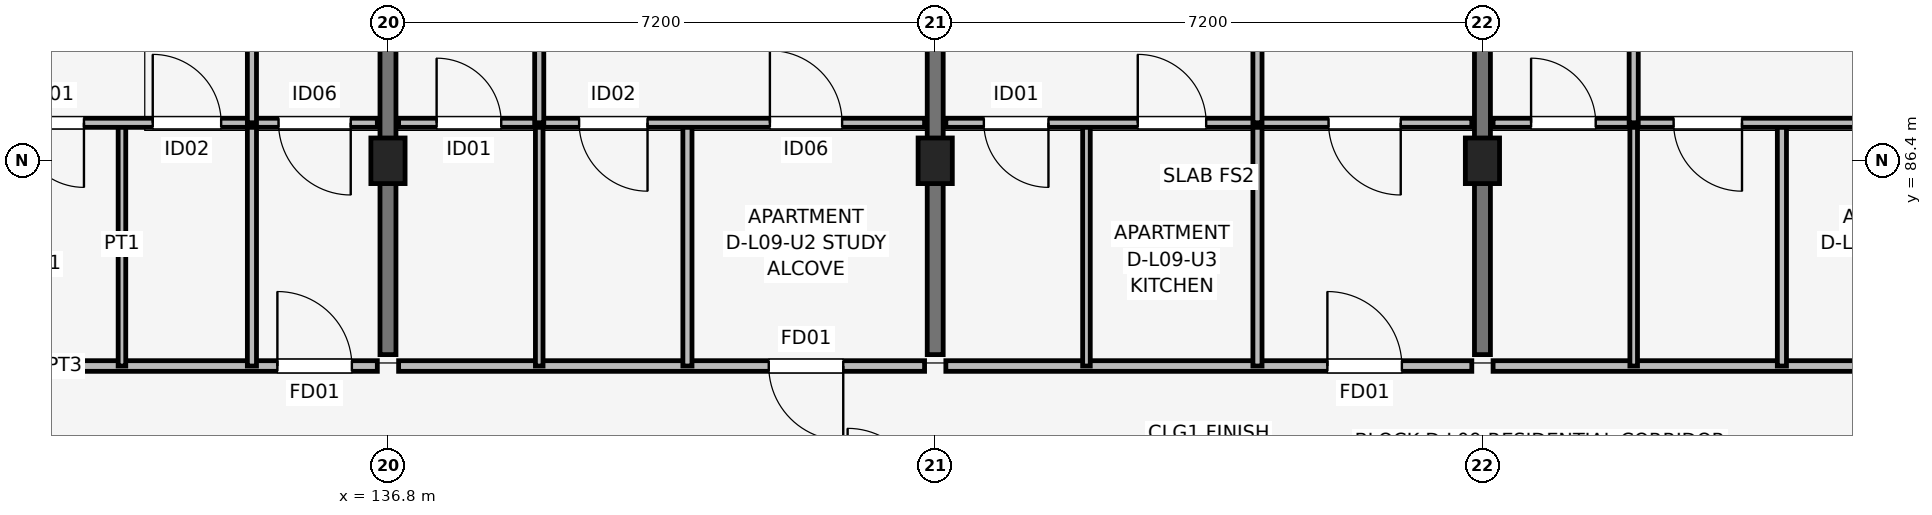
"""IFC4 building model, lengths in metres.
Left out: names, types, materials, properties, quantities, classifications, styles, units other than length and angle.
Written with IfcOpenShell. Run it as: python <this file> out.ifc"""

import sys

from ifc_helpers import new_model, si_unit, direction, frame, frame_2d, origin, origin_2d, place, context, subcontext, project, spatial, rectangle, extrude, element, fill, save


model = new_model("IFC4")
c1 = context("Model", 3, precision=1e-05, world=origin(), true_north=direction((0.0, 1.0)))
c2 = subcontext(c1, "Body", "Model", "MODEL_VIEW")
j1 = project(units=[si_unit("LENGTHUNIT", "METRE"), si_unit("PLANEANGLEUNIT", "RADIAN")], contexts=[c1])
p1 = place(None, origin())
s1 = spatial("IfcSite", under=j1, at=p1, CompositionType="ELEMENT")
p2 = place(p1, origin())
s2 = spatial("IfcBuilding", under=s1, at=p2, CompositionType="ELEMENT")
p3 = place(p2, frame((0.0, 0.0, 30.75)))
s3 = spatial("IfcBuildingStorey", under=s2, at=p3, CompositionType="ELEMENT", Elevation=30.75)
for number, where, z_axis, x_axis in (
    (1, (136.8, 86.4, 0.0), (0.0, 0.0, 1.0), (1.0, 0.0, 0.0)),
    (2, (144.0, 86.4, 0.0), (0.0, 0.0, 1.0), (1.0, 0.0, 0.0)),
    (3, (151.2, 86.4, 0.0), (0.0, 0.0, 1.0), (1.0, 0.0, 0.0)),
):
    element("IfcColumn", number, at=place(p3, frame(where, z_axis=z_axis, x_axis=x_axis)), inside=s3, PredefinedType="COLUMN", context=c2, shape_type="SweptSolid", body=[
        extrude(rectangle(XDim=0.45, YDim=0.6, at=origin_2d()), origin(), (0.0, 0.0, 1.0), 3.15),
    ])
for number, where, z_axis, x_axis in (
    (4, (136.8, 83.85, 0.0), (0.0, 0.0, 1.0), (0.0, 1.0, 0.0)),
    (5, (144.0, 83.85, 0.0), (0.0, 0.0, 1.0), (0.0, 1.0, 0.0)),
    (6, (151.2, 83.85, 0.0), (0.0, 0.0, 1.0), (0.0, 1.0, 0.0)),
):
    element("IfcWall", number, at=place(p3, frame(where, z_axis=z_axis, x_axis=x_axis)), inside=s3, PredefinedType="SHEAR", context=c2, shape_type="SweptSolid", body=[
        extrude(rectangle(XDim=9.4, YDim=0.21, at=frame_2d((4.7, 0.0))), origin(), (0.0, 0.0, 1.0), 3.15),
    ])
p4 = place(p3, frame((129.74, 83.7, 0.0), z_axis=(0.0, 0.0, 1.0), x_axis=(1.0, 0.0, 0.0)))
e7 = element("IfcWall", 7, at=p4, inside=s3, PredefinedType="PARTITIONING", context=c2, shape_type="SweptSolid", body=[
    extrude(rectangle(XDim=6.92, YDim=0.14, at=frame_2d((3.46, 0.0))), origin(), (0.0, 0.0, 1.0), 2.38),
])
p5 = place(p4, frame((5.605, 0.0, 0.0)))
e8 = element("IfcOpeningElement", 8, at=p5, cuts=e7, PredefinedType="OPENING", context=c2, shape_type="SweptSolid", body=[
    extrude(rectangle(XDim=0.98, YDim=2.1, at=frame_2d((0.49, 1.05))), frame((0.0, 0.08, 0.0), z_axis=(0.0, -1.0, 0.0), x_axis=(1.0, 0.0, 0.0)), (0.0, 0.0, 1.0), 0.16),
])
p6 = place(p3, frame((133.3, 83.7, 0.0), z_axis=(0.0, 0.0, 1.0), x_axis=(0.0, 1.0, 0.0)))
e9 = element("IfcWall", 9, at=p6, inside=s3, PredefinedType="PARTITIONING", context=c2, shape_type="SweptSolid", body=[
    extrude(rectangle(XDim=3.2, YDim=0.1, at=frame_2d((1.6, 0.0))), origin(), (0.0, 0.0, 1.0), 2.38),
])
p7 = place(p3, frame((135.01, 83.7, 0.0), z_axis=(0.0, 0.0, 1.0), x_axis=(0.0, 1.0, 0.0)))
e10 = element("IfcWall", 10, at=p7, inside=s3, PredefinedType="PARTITIONING", context=c2, shape_type="SweptSolid", body=[
    extrude(rectangle(XDim=3.2, YDim=0.12, at=frame_2d((1.6, 0.0))), origin(), (0.0, 0.0, 1.0), 2.38),
])
p8 = place(p3, frame((129.74, 86.9, 0.0), z_axis=(0.0, 0.0, 1.0), x_axis=(1.0, 0.0, 0.0)))
e11 = element("IfcWall", 11, at=p8, inside=s3, PredefinedType="PARTITIONING", context=c2, shape_type="SweptSolid", body=[
    extrude(rectangle(XDim=6.92, YDim=0.12, at=frame_2d((3.46, 0.0))), origin(), (0.0, 0.0, 1.0), 2.38),
])
p9 = place(p8, frame((3.06, 0.0, 0.0), z_axis=(0.0, 0.0, 1.0), x_axis=(-1.0, 0.0, 0.0)))
e12 = element("IfcOpeningElement", 12, at=p9, cuts=e11, PredefinedType="OPENING", context=c2, shape_type="SweptSolid", body=[
    extrude(rectangle(XDim=0.85, YDim=2.08, at=frame_2d((0.425, 1.04))), frame((0.0, 0.07, 0.0), z_axis=(0.0, -1.0, 0.0), x_axis=(1.0, 0.0, 0.0)), (0.0, 0.0, 1.0), 0.14),
])
p10 = place(p8, frame((3.965, 0.0, 0.0)))
e13 = element("IfcOpeningElement", 13, at=p10, cuts=e11, PredefinedType="OPENING", context=c2, shape_type="SweptSolid", body=[
    extrude(rectangle(XDim=0.9, YDim=2.08, at=frame_2d((0.45, 1.04))), frame((0.0, 0.07, 0.0), z_axis=(0.0, -1.0, 0.0), x_axis=(1.0, 0.0, 0.0)), (0.0, 0.0, 1.0), 0.14),
])
p11 = place(p8, frame((6.57, 0.0, 0.0), z_axis=(0.0, 0.0, 1.0), x_axis=(-1.0, 0.0, 0.0)))
e14 = element("IfcOpeningElement", 14, at=p11, cuts=e11, PredefinedType="OPENING", context=c2, shape_type="SweptSolid", body=[
    extrude(rectangle(XDim=0.95, YDim=2.08, at=frame_2d((0.475, 1.04))), frame((0.0, 0.07, 0.0), z_axis=(0.0, -1.0, 0.0), x_axis=(1.0, 0.0, 0.0)), (0.0, 0.0, 1.0), 0.14),
])
p12 = place(p3, frame((135.01, 86.9, 0.0), z_axis=(0.0, 0.0, 1.0), x_axis=(0.0, 1.0, 0.0)))
e15 = element("IfcWall", 15, at=p12, inside=s3, PredefinedType="PARTITIONING", context=c2, shape_type="SweptSolid", body=[
    extrude(rectangle(XDim=6.4, YDim=0.12, at=frame_2d((3.2, 0.0))), origin(), (0.0, 0.0, 1.0), 2.38),
])
p13 = place(p12, frame((2.75, 0.0, 0.0)))
e16 = element("IfcOpeningElement", 16, at=p13, cuts=e15, PredefinedType="OPENING", context=c2, shape_type="SweptSolid", body=[
    extrude(rectangle(XDim=0.9, YDim=2.08, at=frame_2d((0.45, 1.04))), frame((0.0, 0.07, 0.0), z_axis=(0.0, -1.0, 0.0), x_axis=(1.0, 0.0, 0.0)), (0.0, 0.0, 1.0), 0.14),
])
p14 = place(p3, frame((136.94, 83.7, 0.0), z_axis=(0.0, 0.0, 1.0), x_axis=(1.0, 0.0, 0.0)))
e17 = element("IfcWall", 17, at=p14, inside=s3, PredefinedType="PARTITIONING", context=c2, shape_type="SweptSolid", body=[
    extrude(rectangle(XDim=6.92, YDim=0.14, at=frame_2d((3.46, 0.0))), origin(), (0.0, 0.0, 1.0), 2.38),
])
p15 = place(p14, frame((5.85, 0.0, 0.0), z_axis=(0.0, 0.0, 1.0), x_axis=(-1.0, 0.0, 0.0)))
e18 = element("IfcOpeningElement", 18, at=p15, cuts=e17, PredefinedType="OPENING", context=c2, shape_type="SweptSolid", body=[
    extrude(rectangle(XDim=0.98, YDim=2.1, at=frame_2d((0.49, 1.05))), frame((0.0, 0.08, 0.0), z_axis=(0.0, -1.0, 0.0), x_axis=(1.0, 0.0, 0.0)), (0.0, 0.0, 1.0), 0.16),
])
p16 = place(p3, frame((138.79, 83.7, 0.0), z_axis=(0.0, 0.0, 1.0), x_axis=(0.0, 1.0, 0.0)))
e19 = element("IfcWall", 19, at=p16, inside=s3, PredefinedType="PARTITIONING", context=c2, shape_type="SweptSolid", body=[
    extrude(rectangle(XDim=3.2, YDim=0.1, at=frame_2d((1.6, 0.0))), origin(), (0.0, 0.0, 1.0), 2.38),
])
p17 = place(p3, frame((140.74, 83.7, 0.0), z_axis=(0.0, 0.0, 1.0), x_axis=(0.0, 1.0, 0.0)))
e20 = element("IfcWall", 20, at=p17, inside=s3, PredefinedType="PARTITIONING", context=c2, shape_type="SweptSolid", body=[
    extrude(rectangle(XDim=3.2, YDim=0.12, at=frame_2d((1.6, 0.0))), origin(), (0.0, 0.0, 1.0), 2.38),
])
p18 = place(p3, frame((136.94, 86.9, 0.0), z_axis=(0.0, 0.0, 1.0), x_axis=(1.0, 0.0, 0.0)))
e21 = element("IfcWall", 21, at=p18, inside=s3, PredefinedType="PARTITIONING", context=c2, shape_type="SweptSolid", body=[
    extrude(rectangle(XDim=6.92, YDim=0.12, at=frame_2d((3.46, 0.0))), origin(), (0.0, 0.0, 1.0), 2.38),
])
p19 = place(p18, frame((0.5, 0.0, 0.0)))
e22 = element("IfcOpeningElement", 22, at=p19, cuts=e21, PredefinedType="OPENING", context=c2, shape_type="SweptSolid", body=[
    extrude(rectangle(XDim=0.85, YDim=2.08, at=frame_2d((0.425, 1.04))), frame((0.0, 0.07, 0.0), z_axis=(0.0, -1.0, 0.0), x_axis=(1.0, 0.0, 0.0)), (0.0, 0.0, 1.0), 0.14),
])
p20 = place(p18, frame((3.275, 0.0, 0.0), z_axis=(0.0, 0.0, 1.0), x_axis=(-1.0, 0.0, 0.0)))
e23 = element("IfcOpeningElement", 23, at=p20, cuts=e21, PredefinedType="OPENING", context=c2, shape_type="SweptSolid", body=[
    extrude(rectangle(XDim=0.9, YDim=2.08, at=frame_2d((0.45, 1.04))), frame((0.0, 0.07, 0.0), z_axis=(0.0, -1.0, 0.0), x_axis=(1.0, 0.0, 0.0)), (0.0, 0.0, 1.0), 0.14),
])
p21 = place(p18, frame((4.885, 0.0, 0.0)))
e24 = element("IfcOpeningElement", 24, at=p21, cuts=e21, PredefinedType="OPENING", context=c2, shape_type="SweptSolid", body=[
    extrude(rectangle(XDim=0.95, YDim=2.08, at=frame_2d((0.475, 1.04))), frame((0.0, 0.07, 0.0), z_axis=(0.0, -1.0, 0.0), x_axis=(1.0, 0.0, 0.0)), (0.0, 0.0, 1.0), 0.14),
])
p22 = place(p3, frame((138.79, 86.9, 0.0), z_axis=(0.0, 0.0, 1.0), x_axis=(0.0, 1.0, 0.0)))
e25 = element("IfcWall", 25, at=p22, inside=s3, PredefinedType="PARTITIONING", context=c2, shape_type="SweptSolid", body=[
    extrude(rectangle(XDim=6.4, YDim=0.12, at=frame_2d((3.2, 0.0))), origin(), (0.0, 0.0, 1.0), 2.38),
])
p23 = place(p22, frame((3.65, 0.0, 0.0), z_axis=(0.0, 0.0, 1.0), x_axis=(-1.0, 0.0, 0.0)))
e26 = element("IfcOpeningElement", 26, at=p23, cuts=e25, PredefinedType="OPENING", context=c2, shape_type="SweptSolid", body=[
    extrude(rectangle(XDim=0.9, YDim=2.08, at=frame_2d((0.45, 1.04))), frame((0.0, 0.07, 0.0), z_axis=(0.0, -1.0, 0.0), x_axis=(1.0, 0.0, 0.0)), (0.0, 0.0, 1.0), 0.14),
])
p24 = place(p3, frame((144.14, 83.7, 0.0), z_axis=(0.0, 0.0, 1.0), x_axis=(1.0, 0.0, 0.0)))
e27 = element("IfcWall", 27, at=p24, inside=s3, PredefinedType="PARTITIONING", context=c2, shape_type="SweptSolid", body=[
    extrude(rectangle(XDim=6.92, YDim=0.14, at=frame_2d((3.46, 0.0))), origin(), (0.0, 0.0, 1.0), 2.38),
])
p25 = place(p24, frame((5.02, 0.0, 0.0)))
e28 = element("IfcOpeningElement", 28, at=p25, cuts=e27, PredefinedType="OPENING", context=c2, shape_type="SweptSolid", body=[
    extrude(rectangle(XDim=0.98, YDim=2.1, at=frame_2d((0.49, 1.05))), frame((0.0, 0.08, 0.0), z_axis=(0.0, -1.0, 0.0), x_axis=(1.0, 0.0, 0.0)), (0.0, 0.0, 1.0), 0.16),
])
p26 = place(p3, frame((145.99, 83.7, 0.0), z_axis=(0.0, 0.0, 1.0), x_axis=(0.0, 1.0, 0.0)))
e29 = element("IfcWall", 29, at=p26, inside=s3, PredefinedType="PARTITIONING", context=c2, shape_type="SweptSolid", body=[
    extrude(rectangle(XDim=3.2, YDim=0.1, at=frame_2d((1.6, 0.0))), origin(), (0.0, 0.0, 1.0), 2.38),
])
p27 = place(p3, frame((148.24, 83.7, 0.0), z_axis=(0.0, 0.0, 1.0), x_axis=(0.0, 1.0, 0.0)))
e30 = element("IfcWall", 30, at=p27, inside=s3, PredefinedType="PARTITIONING", context=c2, shape_type="SweptSolid", body=[
    extrude(rectangle(XDim=3.2, YDim=0.12, at=frame_2d((1.6, 0.0))), origin(), (0.0, 0.0, 1.0), 2.38),
])
p28 = place(p3, frame((144.14, 86.9, 0.0), z_axis=(0.0, 0.0, 1.0), x_axis=(1.0, 0.0, 0.0)))
e31 = element("IfcWall", 31, at=p28, inside=s3, PredefinedType="PARTITIONING", context=c2, shape_type="SweptSolid", body=[
    extrude(rectangle(XDim=6.92, YDim=0.12, at=frame_2d((3.46, 0.0))), origin(), (0.0, 0.0, 1.0), 2.38),
])
p29 = place(p28, frame((1.35, 0.0, 0.0), z_axis=(0.0, 0.0, 1.0), x_axis=(-1.0, 0.0, 0.0)))
e32 = element("IfcOpeningElement", 32, at=p29, cuts=e31, PredefinedType="OPENING", context=c2, shape_type="SweptSolid", body=[
    extrude(rectangle(XDim=0.85, YDim=2.08, at=frame_2d((0.425, 1.04))), frame((0.0, 0.07, 0.0), z_axis=(0.0, -1.0, 0.0), x_axis=(1.0, 0.0, 0.0)), (0.0, 0.0, 1.0), 0.14),
])
p30 = place(p28, frame((2.525, 0.0, 0.0)))
e33 = element("IfcOpeningElement", 33, at=p30, cuts=e31, PredefinedType="OPENING", context=c2, shape_type="SweptSolid", body=[
    extrude(rectangle(XDim=0.9, YDim=2.08, at=frame_2d((0.45, 1.04))), frame((0.0, 0.07, 0.0), z_axis=(0.0, -1.0, 0.0), x_axis=(1.0, 0.0, 0.0)), (0.0, 0.0, 1.0), 0.14),
])
p31 = place(p28, frame((5.985, 0.0, 0.0), z_axis=(0.0, 0.0, 1.0), x_axis=(-1.0, 0.0, 0.0)))
e34 = element("IfcOpeningElement", 34, at=p31, cuts=e31, PredefinedType="OPENING", context=c2, shape_type="SweptSolid", body=[
    extrude(rectangle(XDim=0.95, YDim=2.08, at=frame_2d((0.475, 1.04))), frame((0.0, 0.07, 0.0), z_axis=(0.0, -1.0, 0.0), x_axis=(1.0, 0.0, 0.0)), (0.0, 0.0, 1.0), 0.14),
])
p32 = place(p3, frame((148.24, 86.9, 0.0), z_axis=(0.0, 0.0, 1.0), x_axis=(0.0, 1.0, 0.0)))
e35 = element("IfcWall", 35, at=p32, inside=s3, PredefinedType="PARTITIONING", context=c2, shape_type="SweptSolid", body=[
    extrude(rectangle(XDim=6.4, YDim=0.12, at=frame_2d((3.2, 0.0))), origin(), (0.0, 0.0, 1.0), 2.38),
])
p33 = place(p32, frame((2.75, 0.0, 0.0)))
e36 = element("IfcOpeningElement", 36, at=p33, cuts=e35, PredefinedType="OPENING", context=c2, shape_type="SweptSolid", body=[
    extrude(rectangle(XDim=0.9, YDim=2.08, at=frame_2d((0.45, 1.04))), frame((0.0, 0.07, 0.0), z_axis=(0.0, -1.0, 0.0), x_axis=(1.0, 0.0, 0.0)), (0.0, 0.0, 1.0), 0.14),
])
p34 = place(p3, frame((151.34, 83.7, 0.0), z_axis=(0.0, 0.0, 1.0), x_axis=(1.0, 0.0, 0.0)))
e37 = element("IfcWall", 37, at=p34, inside=s3, PredefinedType="PARTITIONING", context=c2, shape_type="SweptSolid", body=[
    extrude(rectangle(XDim=6.92, YDim=0.14, at=frame_2d((3.46, 0.0))), origin(), (0.0, 0.0, 1.0), 2.38),
])
p35 = place(p34, frame((5.85, 0.0, 0.0), z_axis=(0.0, 0.0, 1.0), x_axis=(-1.0, 0.0, 0.0)))
e38 = element("IfcOpeningElement", 38, at=p35, cuts=e37, PredefinedType="OPENING", context=c2, shape_type="SweptSolid", body=[
    extrude(rectangle(XDim=0.98, YDim=2.1, at=frame_2d((0.49, 1.05))), frame((0.0, 0.08, 0.0), z_axis=(0.0, -1.0, 0.0), x_axis=(1.0, 0.0, 0.0)), (0.0, 0.0, 1.0), 0.16),
])
p36 = place(p3, frame((153.19, 83.7, 0.0), z_axis=(0.0, 0.0, 1.0), x_axis=(0.0, 1.0, 0.0)))
e39 = element("IfcWall", 39, at=p36, inside=s3, PredefinedType="PARTITIONING", context=c2, shape_type="SweptSolid", body=[
    extrude(rectangle(XDim=3.2, YDim=0.1, at=frame_2d((1.6, 0.0))), origin(), (0.0, 0.0, 1.0), 2.38),
])
p37 = place(p3, frame((155.14, 83.7, 0.0), z_axis=(0.0, 0.0, 1.0), x_axis=(0.0, 1.0, 0.0)))
e40 = element("IfcWall", 40, at=p37, inside=s3, PredefinedType="PARTITIONING", context=c2, shape_type="SweptSolid", body=[
    extrude(rectangle(XDim=3.2, YDim=0.12, at=frame_2d((1.6, 0.0))), origin(), (0.0, 0.0, 1.0), 2.38),
])
p38 = place(p3, frame((151.34, 86.9, 0.0), z_axis=(0.0, 0.0, 1.0), x_axis=(1.0, 0.0, 0.0)))
e41 = element("IfcWall", 41, at=p38, inside=s3, PredefinedType="PARTITIONING", context=c2, shape_type="SweptSolid", body=[
    extrude(rectangle(XDim=6.92, YDim=0.12, at=frame_2d((3.46, 0.0))), origin(), (0.0, 0.0, 1.0), 2.38),
])
p39 = place(p38, frame((0.5, 0.0, 0.0)))
e42 = element("IfcOpeningElement", 42, at=p39, cuts=e41, PredefinedType="OPENING", context=c2, shape_type="SweptSolid", body=[
    extrude(rectangle(XDim=0.85, YDim=2.08, at=frame_2d((0.425, 1.04))), frame((0.0, 0.07, 0.0), z_axis=(0.0, -1.0, 0.0), x_axis=(1.0, 0.0, 0.0)), (0.0, 0.0, 1.0), 0.14),
])
p40 = place(p38, frame((3.275, 0.0, 0.0), z_axis=(0.0, 0.0, 1.0), x_axis=(-1.0, 0.0, 0.0)))
e43 = element("IfcOpeningElement", 43, at=p40, cuts=e41, PredefinedType="OPENING", context=c2, shape_type="SweptSolid", body=[
    extrude(rectangle(XDim=0.9, YDim=2.08, at=frame_2d((0.45, 1.04))), frame((0.0, 0.07, 0.0), z_axis=(0.0, -1.0, 0.0), x_axis=(1.0, 0.0, 0.0)), (0.0, 0.0, 1.0), 0.14),
])
p41 = place(p38, frame((4.885, 0.0, 0.0)))
e44 = element("IfcOpeningElement", 44, at=p41, cuts=e41, PredefinedType="OPENING", context=c2, shape_type="SweptSolid", body=[
    extrude(rectangle(XDim=0.95, YDim=2.08, at=frame_2d((0.475, 1.04))), frame((0.0, 0.07, 0.0), z_axis=(0.0, -1.0, 0.0), x_axis=(1.0, 0.0, 0.0)), (0.0, 0.0, 1.0), 0.14),
])
p42 = place(p3, frame((153.19, 86.9, 0.0), z_axis=(0.0, 0.0, 1.0), x_axis=(0.0, 1.0, 0.0)))
e45 = element("IfcWall", 45, at=p42, inside=s3, PredefinedType="PARTITIONING", context=c2, shape_type="SweptSolid", body=[
    extrude(rectangle(XDim=6.4, YDim=0.12, at=frame_2d((3.2, 0.0))), origin(), (0.0, 0.0, 1.0), 2.38),
])
p43 = place(p42, frame((3.65, 0.0, 0.0), z_axis=(0.0, 0.0, 1.0), x_axis=(-1.0, 0.0, 0.0)))
e46 = element("IfcOpeningElement", 46, at=p43, cuts=e45, PredefinedType="OPENING", context=c2, shape_type="SweptSolid", body=[
    extrude(rectangle(XDim=0.9, YDim=2.08, at=frame_2d((0.45, 1.04))), frame((0.0, 0.07, 0.0), z_axis=(0.0, -1.0, 0.0), x_axis=(1.0, 0.0, 0.0)), (0.0, 0.0, 1.0), 0.14),
])
p44 = place(p5, origin())
e47 = element("IfcDoor", 47, at=p44, inside=s3, OperationType="SINGLE_SWING_LEFT", PredefinedType="DOOR", context=c2, shape_type="SweptSolid", body=[
    extrude(rectangle(XDim=0.98, YDim=2.1, at=frame_2d((0.49, 1.05))), frame((0.0, 0.025, 0.0), z_axis=(0.0, -1.0, 0.0), x_axis=(1.0, 0.0, 0.0)), (0.0, 0.0, 1.0), 0.05),
])
fill(e8, e47)
p45 = place(p9, origin())
e48 = element("IfcDoor", 48, at=p45, inside=s3, OperationType="SINGLE_SWING_RIGHT", PredefinedType="DOOR", context=c2, shape_type="SweptSolid", body=[
    extrude(rectangle(XDim=0.85, YDim=2.08, at=frame_2d((0.425, 1.04))), frame((0.0, 0.025, 0.0), z_axis=(0.0, -1.0, 0.0), x_axis=(1.0, 0.0, 0.0)), (0.0, 0.0, 1.0), 0.05),
])
fill(e12, e48)
p46 = place(p10, origin())
e49 = element("IfcDoor", 49, at=p46, inside=s3, OperationType="SINGLE_SWING_LEFT", PredefinedType="DOOR", context=c2, shape_type="SweptSolid", body=[
    extrude(rectangle(XDim=0.9, YDim=2.08, at=frame_2d((0.45, 1.04))), frame((0.0, 0.025, 0.0), z_axis=(0.0, -1.0, 0.0), x_axis=(1.0, 0.0, 0.0)), (0.0, 0.0, 1.0), 0.05),
])
fill(e13, e49)
p47 = place(p11, origin())
e50 = element("IfcDoor", 50, at=p47, inside=s3, OperationType="SINGLE_SWING_RIGHT", PredefinedType="DOOR", context=c2, shape_type="SweptSolid", body=[
    extrude(rectangle(XDim=0.95, YDim=2.08, at=frame_2d((0.475, 1.04))), frame((0.0, 0.025, 0.0), z_axis=(0.0, -1.0, 0.0), x_axis=(1.0, 0.0, 0.0)), (0.0, 0.0, 1.0), 0.05),
])
fill(e14, e50)
p48 = place(p15, origin())
e51 = element("IfcDoor", 51, at=p48, inside=s3, OperationType="SINGLE_SWING_RIGHT", PredefinedType="DOOR", context=c2, shape_type="SweptSolid", body=[
    extrude(rectangle(XDim=0.98, YDim=2.1, at=frame_2d((0.49, 1.05))), frame((0.0, 0.025, 0.0), z_axis=(0.0, -1.0, 0.0), x_axis=(1.0, 0.0, 0.0)), (0.0, 0.0, 1.0), 0.05),
])
fill(e18, e51)
p49 = place(p19, origin())
e52 = element("IfcDoor", 52, at=p49, inside=s3, OperationType="SINGLE_SWING_LEFT", PredefinedType="DOOR", context=c2, shape_type="SweptSolid", body=[
    extrude(rectangle(XDim=0.85, YDim=2.08, at=frame_2d((0.425, 1.04))), frame((0.0, 0.025, 0.0), z_axis=(0.0, -1.0, 0.0), x_axis=(1.0, 0.0, 0.0)), (0.0, 0.0, 1.0), 0.05),
])
fill(e22, e52)
p50 = place(p20, origin())
e53 = element("IfcDoor", 53, at=p50, inside=s3, OperationType="SINGLE_SWING_RIGHT", PredefinedType="DOOR", context=c2, shape_type="SweptSolid", body=[
    extrude(rectangle(XDim=0.9, YDim=2.08, at=frame_2d((0.45, 1.04))), frame((0.0, 0.025, 0.0), z_axis=(0.0, -1.0, 0.0), x_axis=(1.0, 0.0, 0.0)), (0.0, 0.0, 1.0), 0.05),
])
fill(e23, e53)
p51 = place(p21, origin())
e54 = element("IfcDoor", 54, at=p51, inside=s3, OperationType="SINGLE_SWING_LEFT", PredefinedType="DOOR", context=c2, shape_type="SweptSolid", body=[
    extrude(rectangle(XDim=0.95, YDim=2.08, at=frame_2d((0.475, 1.04))), frame((0.0, 0.025, 0.0), z_axis=(0.0, -1.0, 0.0), x_axis=(1.0, 0.0, 0.0)), (0.0, 0.0, 1.0), 0.05),
])
fill(e24, e54)
p52 = place(p25, origin())
e55 = element("IfcDoor", 55, at=p52, inside=s3, OperationType="SINGLE_SWING_LEFT", PredefinedType="DOOR", context=c2, shape_type="SweptSolid", body=[
    extrude(rectangle(XDim=0.98, YDim=2.1, at=frame_2d((0.49, 1.05))), frame((0.0, 0.025, 0.0), z_axis=(0.0, -1.0, 0.0), x_axis=(1.0, 0.0, 0.0)), (0.0, 0.0, 1.0), 0.05),
])
fill(e28, e55)
p53 = place(p29, origin())
e56 = element("IfcDoor", 56, at=p53, inside=s3, OperationType="SINGLE_SWING_RIGHT", PredefinedType="DOOR", context=c2, shape_type="SweptSolid", body=[
    extrude(rectangle(XDim=0.85, YDim=2.08, at=frame_2d((0.425, 1.04))), frame((0.0, 0.025, 0.0), z_axis=(0.0, -1.0, 0.0), x_axis=(1.0, 0.0, 0.0)), (0.0, 0.0, 1.0), 0.05),
])
fill(e32, e56)
p54 = place(p30, origin())
e57 = element("IfcDoor", 57, at=p54, inside=s3, OperationType="SINGLE_SWING_LEFT", PredefinedType="DOOR", context=c2, shape_type="SweptSolid", body=[
    extrude(rectangle(XDim=0.9, YDim=2.08, at=frame_2d((0.45, 1.04))), frame((0.0, 0.025, 0.0), z_axis=(0.0, -1.0, 0.0), x_axis=(1.0, 0.0, 0.0)), (0.0, 0.0, 1.0), 0.05),
])
fill(e33, e57)
p55 = place(p31, origin())
e58 = element("IfcDoor", 58, at=p55, inside=s3, OperationType="SINGLE_SWING_RIGHT", PredefinedType="DOOR", context=c2, shape_type="SweptSolid", body=[
    extrude(rectangle(XDim=0.95, YDim=2.08, at=frame_2d((0.475, 1.04))), frame((0.0, 0.025, 0.0), z_axis=(0.0, -1.0, 0.0), x_axis=(1.0, 0.0, 0.0)), (0.0, 0.0, 1.0), 0.05),
])
fill(e34, e58)
p56 = place(p39, origin())
e59 = element("IfcDoor", 59, at=p56, inside=s3, OperationType="SINGLE_SWING_LEFT", PredefinedType="DOOR", context=c2, shape_type="SweptSolid", body=[
    extrude(rectangle(XDim=0.85, YDim=2.08, at=frame_2d((0.425, 1.04))), frame((0.0, 0.025, 0.0), z_axis=(0.0, -1.0, 0.0), x_axis=(1.0, 0.0, 0.0)), (0.0, 0.0, 1.0), 0.05),
])
fill(e42, e59)
p57 = place(p40, origin())
e60 = element("IfcDoor", 60, at=p57, inside=s3, OperationType="SINGLE_SWING_RIGHT", PredefinedType="DOOR", context=c2, shape_type="SweptSolid", body=[
    extrude(rectangle(XDim=0.9, YDim=2.08, at=frame_2d((0.45, 1.04))), frame((0.0, 0.025, 0.0), z_axis=(0.0, -1.0, 0.0), x_axis=(1.0, 0.0, 0.0)), (0.0, 0.0, 1.0), 0.05),
])
fill(e43, e60)
save(model, sys.argv[1])
